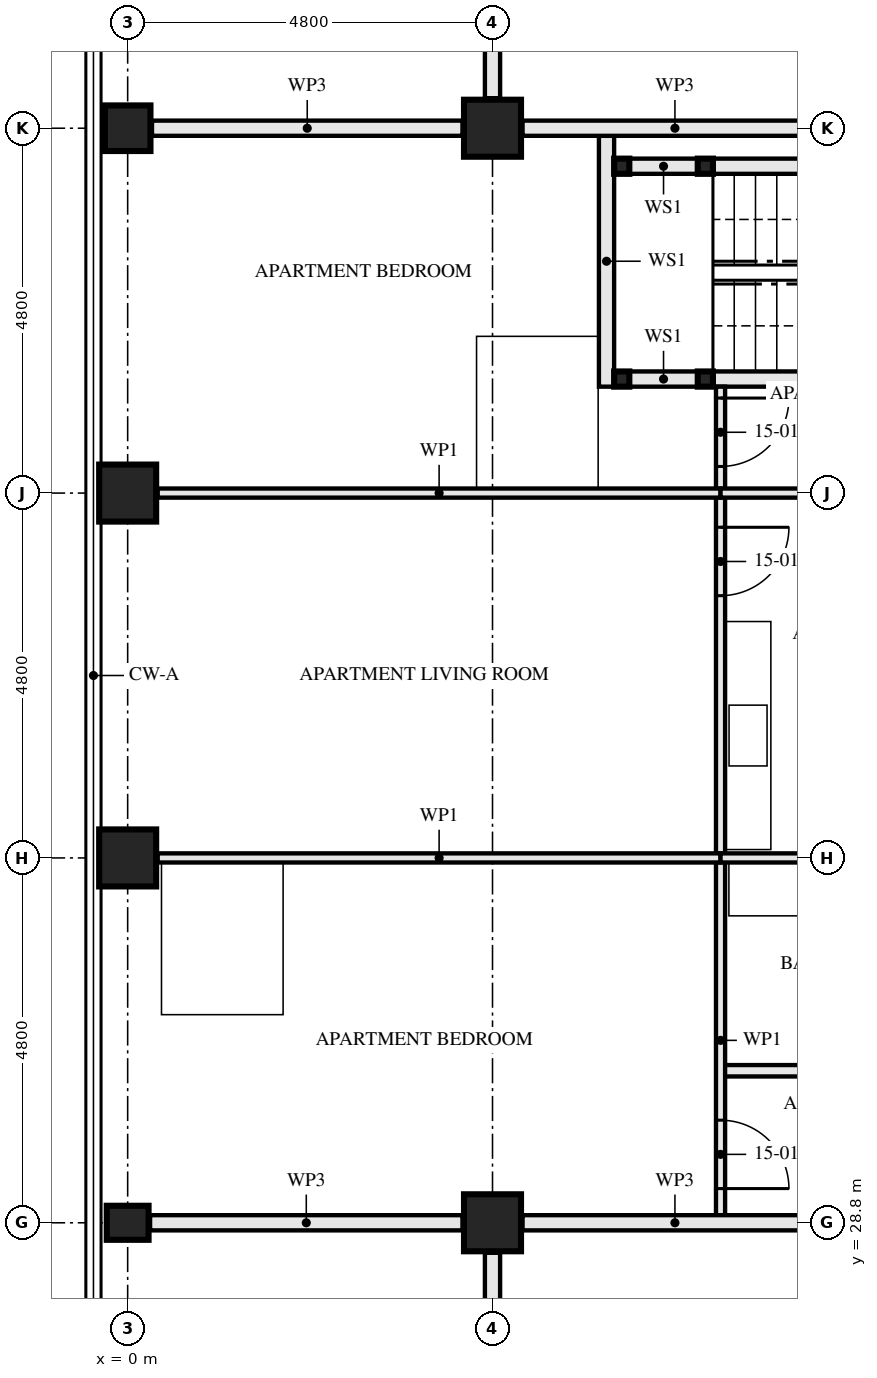
"""IFC4 building model, lengths in metres.
Left out: names, types, materials, properties, quantities, classifications, styles, units other than length and angle.
Written with IfcOpenShell. Run it as: python <this file> out.ifc"""

import sys

from ifc_helpers import new_model, si_unit, direction, frame, frame_2d, origin, origin_2d, place, context, subcontext, project, spatial, rectangle, hollow_rectangle, i_section, extrude, element, fill, save


model = new_model("IFC4")
c1 = context("Model", 3, precision=1e-05, world=origin(), true_north=direction((0.0, 1.0)))
c2 = subcontext(c1, "Body", "Model", "MODEL_VIEW")
j1 = project(units=[si_unit("LENGTHUNIT", "METRE"), si_unit("PLANEANGLEUNIT", "RADIAN")], contexts=[c1])
p1 = place(None, origin())
s1 = spatial("IfcSite", under=j1, at=p1, CompositionType="ELEMENT")
p2 = place(p1, origin())
s2 = spatial("IfcBuilding", under=s1, at=p2, CompositionType="ELEMENT")
p3 = place(p2, frame((0.0, 0.0, 58.5)))
s3 = spatial("IfcBuildingStorey", under=s2, at=p3, CompositionType="ELEMENT", Elevation=58.5)
p4 = place(p3, frame((0.0, 28.8, 0.0), z_axis=(0.0, 0.0, 1.0), x_axis=(0.0, 1.0, 0.0)))
e1 = element("IfcColumn", 1, at=p4, inside=s3, PredefinedType="COLUMN", context=c2, shape_type="SweptSolid", body=[
    extrude(i_section(OverallWidth=0.448, OverallDepth=0.55, WebThickness=0.072, FlangeThickness=0.115, FilletRadius=0.015, at=origin_2d()), origin(), (0.0, 0.0, 1.0), 3.5),
])
for number, where, z_axis, x_axis in (
    (2, (0.0, 33.6, 0.0), (0.0, 0.0, 1.0), (1.0, 0.0, 0.0)),
    (3, (0.0, 38.4, 0.0), (0.0, 0.0, 1.0), (1.0, 0.0, 0.0)),
):
    element("IfcColumn", number, at=place(p3, frame(where, z_axis=z_axis, x_axis=x_axis)), inside=s3, PredefinedType="COLUMN", context=c2, shape_type="SweptSolid", body=[
        extrude(hollow_rectangle(XDim=0.75, YDim=0.75, WallThickness=0.08, at=origin_2d()), origin(), (0.0, 0.0, 1.0), 3.5),
    ])
p5 = place(p3, frame((0.0, 43.2, 0.0), z_axis=(0.0, 0.0, 1.0), x_axis=(0.0, 1.0, 0.0)))
e4 = element("IfcColumn", 4, at=p5, inside=s3, PredefinedType="COLUMN", context=c2, shape_type="SweptSolid", body=[
    extrude(hollow_rectangle(XDim=0.6, YDim=0.6, WallThickness=0.08, at=origin_2d()), origin(), (0.0, 0.0, 1.0), 3.5),
])
for number, where, z_axis, x_axis in (
    (5, (4.8, 28.8, 0.0), (0.0, 0.0, 1.0), (0.0, 1.0, 0.0)),
    (6, (4.8, 43.2, 0.0), (0.0, 0.0, 1.0), (0.0, 1.0, 0.0)),
):
    element("IfcColumn", number, at=place(p3, frame(where, z_axis=z_axis, x_axis=x_axis)), inside=s3, PredefinedType="COLUMN", context=c2, shape_type="SweptSolid", body=[
        extrude(hollow_rectangle(XDim=0.75, YDim=0.75, WallThickness=0.08, at=origin_2d()), origin(), (0.0, 0.0, 1.0), 3.5),
    ])
for number, where, z_axis, x_axis in (
    (7, (6.5, 42.7, 0.0), (0.0, 0.0, 1.0), (1.0, 0.0, 0.0)),
    (8, (6.5, 39.9, 0.0), (0.0, 0.0, 1.0), (1.0, 0.0, 0.0)),
    (9, (7.6, 42.7, 0.0), (0.0, 0.0, 1.0), (1.0, 0.0, 0.0)),
    (10, (7.6, 39.9, 0.0), (0.0, 0.0, 1.0), (1.0, 0.0, 0.0)),
):
    element("IfcColumn", number, at=place(p3, frame(where, z_axis=z_axis, x_axis=x_axis)), inside=s3, PredefinedType="COLUMN", context=c2, shape_type="SweptSolid", body=[
        extrude(hollow_rectangle(XDim=0.2, YDim=0.2, WallThickness=0.008, at=origin_2d()), origin(), (0.0, 0.0, 1.0), 3.33),
    ])
p6 = place(p3, frame((4.8, 26.8, 0.0), z_axis=(0.0, 0.0, 1.0), x_axis=(0.0, 1.0, 0.0)))
e11 = element("IfcWall", 11, at=p6, inside=s3, PredefinedType="PARTITIONING", context=c2, shape_type="SweptSolid", body=[
    extrude(rectangle(XDim=1.605, YDim=0.2, at=frame_2d((0.802, 0.0))), origin(), (0.0, 0.0, 1.0), 3.33),
])
p7 = place(p3, frame((6.6, 42.7, 0.0), z_axis=(0.0, 0.0, 1.0), x_axis=(1.0, 0.0, 0.0)))
e12 = element("IfcWall", 12, at=p7, inside=s3, PredefinedType="SOLIDWALL", context=c2, shape_type="SweptSolid", body=[
    extrude(rectangle(XDim=0.9, YDim=0.2, at=frame_2d((0.45, 0.0))), origin(), (0.0, 0.0, 1.0), 2.99),
])
p8 = place(p3, frame((7.7, 42.7, 0.0), z_axis=(0.0, 0.0, 1.0), x_axis=(1.0, 0.0, 0.0)))
e13 = element("IfcWall", 13, at=p8, inside=s3, PredefinedType="SOLIDWALL", context=c2, shape_type="SweptSolid", body=[
    extrude(rectangle(XDim=4.7, YDim=0.2, at=frame_2d((2.35, 0.0))), origin(), (0.0, 0.0, 1.0), 2.99),
])
p9 = place(p3, frame((6.6, 39.9, 0.0), z_axis=(0.0, 0.0, 1.0), x_axis=(1.0, 0.0, 0.0)))
e14 = element("IfcWall", 14, at=p9, inside=s3, PredefinedType="SOLIDWALL", context=c2, shape_type="SweptSolid", body=[
    extrude(rectangle(XDim=0.9, YDim=0.2, at=frame_2d((0.45, 0.0))), origin(), (0.0, 0.0, 1.0), 2.99),
])
p10 = place(p3, frame((7.7, 39.9, 0.0), z_axis=(0.0, 0.0, 1.0), x_axis=(1.0, 0.0, 0.0)))
e15 = element("IfcWall", 15, at=p10, inside=s3, PredefinedType="SOLIDWALL", context=c2, shape_type="SweptSolid", body=[
    extrude(rectangle(XDim=4.7, YDim=0.2, at=frame_2d((2.35, 0.0))), origin(), (0.0, 0.0, 1.0), 2.99),
])
p11 = place(p3, frame((6.3, 43.1, 0.0), z_axis=(0.0, 0.0, 1.0), x_axis=(0.0, -1.0, 0.0)))
e16 = element("IfcWall", 16, at=p11, inside=s3, PredefinedType="SOLIDWALL", context=c2, shape_type="SweptSolid", body=[
    extrude(rectangle(XDim=3.3, YDim=0.2, at=frame_2d((1.65, 0.0))), origin(), (0.0, 0.0, 1.0), 3.33),
])
p12 = place(p3, frame((7.8, 30.8, 0.0), z_axis=(0.0, 0.0, 1.0), x_axis=(1.0, 0.0, 0.0)))
e17 = element("IfcWall", 17, at=p12, inside=s3, PredefinedType="PARTITIONING", context=c2, shape_type="SweptSolid", body=[
    extrude(rectangle(XDim=3.0, YDim=0.15, at=frame_2d((1.5, 0.0))), origin(), (0.0, 0.0, 1.0), 3.33),
])
p13 = place(p12, frame((1.05, 0.0, 0.0)))
e18 = element("IfcOpeningElement", 18, at=p13, cuts=e17, PredefinedType="OPENING", context=c2, shape_type="SweptSolid", body=[
    extrude(rectangle(XDim=0.9, YDim=2.1, at=frame_2d((0.45, 1.05))), frame((0.0, 0.085, 0.0), z_axis=(0.0, -1.0, 0.0), x_axis=(1.0, 0.0, 0.0)), (0.0, 0.0, 1.0), 0.171),
])
p14 = place(p3, frame((7.8, 38.4, 0.0), z_axis=(0.0, 0.0, 1.0), x_axis=(1.0, 0.0, 0.0)))
e19 = element("IfcWall", 19, at=p14, inside=s3, PredefinedType="PARTITIONING", context=c2, shape_type="SweptSolid", body=[
    extrude(rectangle(XDim=4.65, YDim=0.12, at=frame_2d((2.325, 0.0))), origin(), (0.0, 0.0, 1.0), 2.55),
])
p15 = place(p14, frame((1.875, 0.0, 0.0)))
e20 = element("IfcOpeningElement", 20, at=p15, cuts=e19, PredefinedType="OPENING", context=c2, shape_type="SweptSolid", body=[
    extrude(rectangle(XDim=0.9, YDim=2.1, at=frame_2d((0.45, 1.05))), frame((0.0, 0.071, 0.0), z_axis=(0.0, -1.0, 0.0), x_axis=(1.0, 0.0, 0.0)), (0.0, 0.0, 1.0), 0.141),
])
p16 = place(p3, frame((7.8, 33.6, 0.0), z_axis=(0.0, 0.0, 1.0), x_axis=(1.0, 0.0, 0.0)))
e21 = element("IfcWall", 21, at=p16, inside=s3, PredefinedType="PARTITIONING", context=c2, shape_type="SweptSolid", body=[
    extrude(rectangle(XDim=4.65, YDim=0.12, at=frame_2d((2.325, 0.0))), origin(), (0.0, 0.0, 1.0), 2.55),
])
p17 = place(p16, frame((3.35, 0.0, 0.0)))
e22 = element("IfcOpeningElement", 22, at=p17, cuts=e21, PredefinedType="OPENING", context=c2, shape_type="SweptSolid", body=[
    extrude(rectangle(XDim=0.9, YDim=2.1, at=frame_2d((0.45, 1.05))), frame((0.0, 0.071, 0.0), z_axis=(0.0, -1.0, 0.0), x_axis=(1.0, 0.0, 0.0)), (0.0, 0.0, 1.0), 0.141),
])
p18 = place(p3, frame((7.8, 39.8, 0.0), z_axis=(0.0, 0.0, 1.0), x_axis=(0.0, -1.0, 0.0)))
e23 = element("IfcWall", 23, at=p18, inside=s3, PredefinedType="PARTITIONING", context=c2, shape_type="SweptSolid", body=[
    extrude(rectangle(XDim=1.4, YDim=0.12, at=frame_2d((0.7, 0.0))), origin(), (0.0, 0.0, 1.0), 3.33),
])
p19 = place(p18, frame((0.15, 0.0, 0.0)))
e24 = element("IfcOpeningElement", 24, at=p19, cuts=e23, PredefinedType="OPENING", context=c2, shape_type="SweptSolid", body=[
    extrude(rectangle(XDim=0.9, YDim=2.1, at=frame_2d((0.45, 1.05))), frame((0.0, 0.071, 0.0), z_axis=(0.0, -1.0, 0.0), x_axis=(1.0, 0.0, 0.0)), (0.0, 0.0, 1.0), 0.141),
])
p20 = place(p3, frame((7.8, 38.4, 0.0), z_axis=(0.0, 0.0, 1.0), x_axis=(0.0, -1.0, 0.0)))
e25 = element("IfcWall", 25, at=p20, inside=s3, PredefinedType="PARTITIONING", context=c2, shape_type="SweptSolid", body=[
    extrude(rectangle(XDim=4.8, YDim=0.12, at=frame_2d((2.4, 0.0))), origin(), (0.0, 0.0, 1.0), 3.33),
])
p21 = place(p20, frame((0.45, 0.0, 0.0)))
e26 = element("IfcOpeningElement", 26, at=p21, cuts=e25, PredefinedType="OPENING", context=c2, shape_type="SweptSolid", body=[
    extrude(rectangle(XDim=0.9, YDim=2.1, at=frame_2d((0.45, 1.05))), frame((0.0, 0.071, 0.0), z_axis=(0.0, -1.0, 0.0), x_axis=(1.0, 0.0, 0.0)), (0.0, 0.0, 1.0), 0.141),
])
p22 = place(p3, frame((7.8, 33.6, 0.0), z_axis=(0.0, 0.0, 1.0), x_axis=(0.0, -1.0, 0.0)))
e27 = element("IfcWall", 27, at=p22, inside=s3, PredefinedType="PARTITIONING", context=c2, shape_type="SweptSolid", body=[
    extrude(rectangle(XDim=4.8, YDim=0.12, at=frame_2d((2.4, 0.0))), origin(), (0.0, 0.0, 1.0), 3.33),
])
p23 = place(p22, frame((3.45, 0.0, 0.0)))
e28 = element("IfcOpeningElement", 28, at=p23, cuts=e27, PredefinedType="OPENING", context=c2, shape_type="SweptSolid", body=[
    extrude(rectangle(XDim=0.9, YDim=2.1, at=frame_2d((0.45, 1.05))), frame((0.0, 0.071, 0.0), z_axis=(0.0, -1.0, 0.0), x_axis=(1.0, 0.0, 0.0)), (0.0, 0.0, 1.0), 0.141),
])
for number, where, z_axis, x_axis in (
    (29, (0.395, 38.4, 0.0), (0.0, 0.0, 1.0), (1.0, 0.0, 0.0)),
    (30, (0.395, 33.6, 0.0), (0.0, 0.0, 1.0), (1.0, 0.0, 0.0)),
):
    element("IfcWall", number, at=place(p3, frame(where, z_axis=z_axis, x_axis=x_axis)), inside=s3, PredefinedType="PARTITIONING", context=c2, shape_type="SweptSolid", body=[
        extrude(rectangle(XDim=7.405, YDim=0.12, at=frame_2d((3.703, 0.0))), origin(), (0.0, 0.0, 1.0), 2.55),
    ])
p24 = place(p3, frame((4.8, 45.2, 0.0), z_axis=(0.0, 0.0, 1.0), x_axis=(0.0, -1.0, 0.0)))
e31 = element("IfcWall", 31, at=p24, inside=s3, PredefinedType="PARTITIONING", context=c2, shape_type="SweptSolid", body=[
    extrude(rectangle(XDim=1.605, YDim=0.2, at=frame_2d((0.802, 0.0))), origin(), (0.0, 0.0, 1.0), 3.33),
])
p25 = place(p3, frame((9.205, 28.8, 0.0), z_axis=(0.0, 0.0, 1.0), x_axis=(-1.0, 0.0, 0.0)))
e32 = element("IfcWall", 32, at=p25, inside=s3, PredefinedType="PARTITIONING", context=c2, shape_type="SweptSolid", body=[
    extrude(rectangle(XDim=4.01, YDim=0.2, at=frame_2d((2.005, 0.0))), origin(), (0.0, 0.0, 1.0), 2.32),
])
p26 = place(p3, frame((4.405, 28.8, 0.0), z_axis=(0.0, 0.0, 1.0), x_axis=(-1.0, 0.0, 0.0)))
e33 = element("IfcWall", 33, at=p26, inside=s3, PredefinedType="PARTITIONING", context=c2, shape_type="SweptSolid", body=[
    extrude(rectangle(XDim=4.11, YDim=0.2, at=frame_2d((2.055, 0.0))), origin(), (0.0, 0.0, 1.0), 2.32),
])
p27 = place(p3, frame((9.205, 43.2, 0.0), z_axis=(0.0, 0.0, 1.0), x_axis=(-1.0, 0.0, 0.0)))
e34 = element("IfcWall", 34, at=p27, inside=s3, PredefinedType="PARTITIONING", context=c2, shape_type="SweptSolid", body=[
    extrude(rectangle(XDim=4.01, YDim=0.2, at=frame_2d((2.005, 0.0))), origin(), (0.0, 0.0, 1.0), 2.32),
])
p28 = place(p3, frame((4.405, 43.2, 0.0), z_axis=(0.0, 0.0, 1.0), x_axis=(-1.0, 0.0, 0.0)))
e35 = element("IfcWall", 35, at=p28, inside=s3, PredefinedType="PARTITIONING", context=c2, shape_type="SweptSolid", body=[
    extrude(rectangle(XDim=4.085, YDim=0.2, at=frame_2d((2.042, 0.0))), origin(), (0.0, 0.0, 1.0), 2.32),
])
p29 = place(p19, origin())
e36 = element("IfcDoor", 36, at=p29, inside=s3, OperationType="SINGLE_SWING_RIGHT", PredefinedType="DOOR", context=c2, shape_type="SweptSolid", body=[
    extrude(rectangle(XDim=0.9, YDim=2.1, at=frame_2d((0.45, 1.05))), frame((0.0, 0.022, 0.0), z_axis=(0.0, -1.0, 0.0), x_axis=(1.0, 0.0, 0.0)), (0.0, 0.0, 1.0), 0.044),
])
fill(e24, e36)
p30 = place(p21, origin())
e37 = element("IfcDoor", 37, at=p30, inside=s3, OperationType="SINGLE_SWING_RIGHT", PredefinedType="DOOR", context=c2, shape_type="SweptSolid", body=[
    extrude(rectangle(XDim=0.9, YDim=2.1, at=frame_2d((0.45, 1.05))), frame((0.0, 0.022, 0.0), z_axis=(0.0, -1.0, 0.0), x_axis=(1.0, 0.0, 0.0)), (0.0, 0.0, 1.0), 0.044),
])
fill(e26, e37)
p31 = place(p23, origin())
e38 = element("IfcDoor", 38, at=p31, inside=s3, OperationType="SINGLE_SWING_LEFT", PredefinedType="DOOR", context=c2, shape_type="SweptSolid", body=[
    extrude(rectangle(XDim=0.9, YDim=2.1, at=frame_2d((0.45, 1.05))), frame((0.0, 0.022, 0.0), z_axis=(0.0, -1.0, 0.0), x_axis=(1.0, 0.0, 0.0)), (0.0, 0.0, 1.0), 0.044),
])
fill(e28, e38)
save(model, sys.argv[1])
